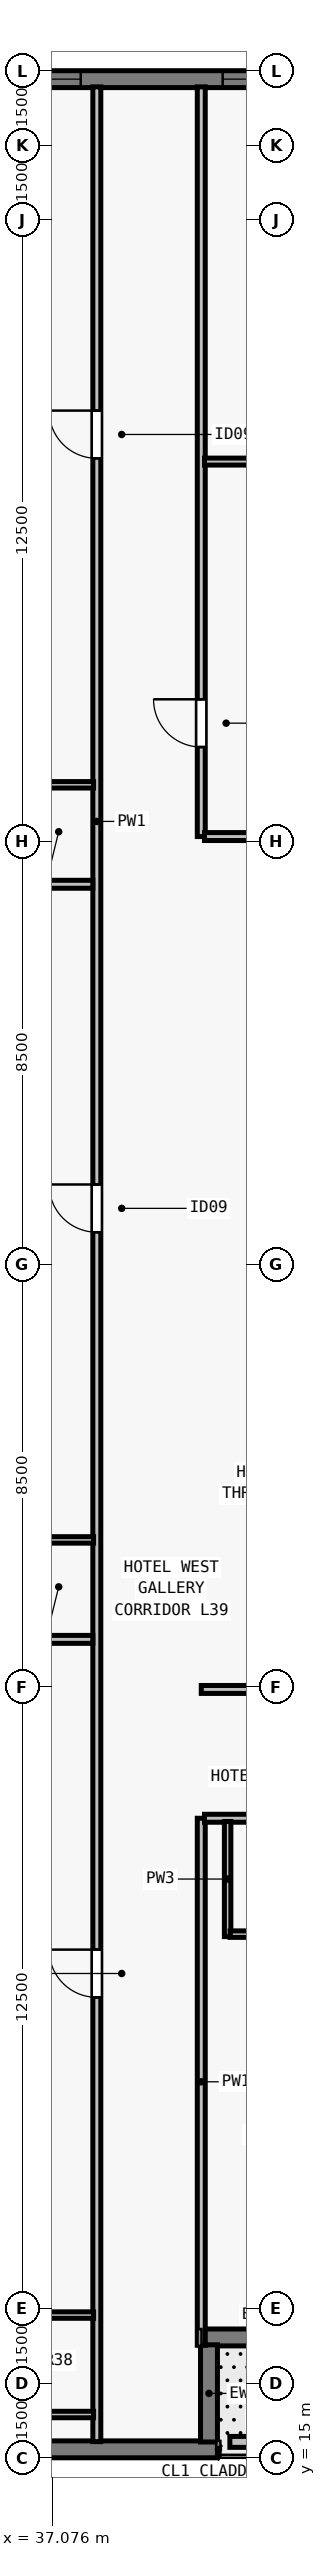
"""IFC4 building model, lengths in metres.
Left out: names, types, materials, properties, quantities, classifications, styles, units other than length and angle.
Written with IfcOpenShell. Run it as: python <this file> out.ifc"""

import sys

from ifc_helpers import new_model, si_unit, direction, frame, frame_2d, origin, place, context, subcontext, project, spatial, rectangle, extrude, element, fill, save


model = new_model("IFC4")
c1 = context("Model", 3, precision=1e-05, world=origin(), true_north=direction((0.0, 1.0)))
c2 = subcontext(c1, "Body", "Model", "MODEL_VIEW")
j1 = project(units=[si_unit("LENGTHUNIT", "METRE"), si_unit("PLANEANGLEUNIT", "RADIAN")], contexts=[c1])
p1 = place(None, origin())
s1 = spatial("IfcSite", under=j1, at=p1, CompositionType="ELEMENT")
p2 = place(p1, origin())
s2 = spatial("IfcBuilding", under=s1, at=p2, CompositionType="ELEMENT")
p3 = place(p2, frame((0.0, 0.0, 144.5)))
s3 = spatial("IfcBuildingStorey", under=s2, at=p3, CompositionType="ELEMENT", Elevation=144.5)
p4 = place(p3, frame((40.4, 15.17, 0.0), z_axis=(0.0, 0.0, 1.0), x_axis=(-1.0, 0.0, 0.0)))
e1 = element("IfcWall", 1, at=p4, inside=s3, PredefinedType="SOLIDWALL", context=c2, shape_type="SweptSolid", body=[
    extrude(rectangle(XDim=8.082, YDim=0.34, at=frame_2d((4.041, 0.0))), origin(), (0.0, 0.0, 1.0), 3.28),
])
p5 = place(p3, frame((32.0, 62.83, 0.0), z_axis=(0.0, 0.0, 1.0), x_axis=(1.0, 0.0, 0.0)))
e2 = element("IfcWall", 2, at=p5, inside=s3, PredefinedType="SOLIDWALL", context=c2, shape_type="SweptSolid", body=[
    extrude(rectangle(XDim=39.682, YDim=0.34, at=frame_2d((19.841, 0.0))), origin(), (0.0, 0.0, 1.0), 3.28),
])
p6 = place(p5, frame((3.902, 0.0, 0.8)))
e3 = element("IfcOpeningElement", 3, at=p6, cuts=e2, PredefinedType="OPENING", context=c2, shape_type="SweptSolid", body=[
    extrude(rectangle(XDim=1.75, YDim=1.66, at=frame_2d((0.875, 0.83))), frame((0.0, 0.18, 0.0), z_axis=(0.0, -1.0, 0.0), x_axis=(1.0, 0.0, 0.0)), (0.0, 0.0, 1.0), 0.36),
])
p7 = place(p5, frame((8.505, 0.0, 0.8)))
e4 = element("IfcOpeningElement", 4, at=p7, cuts=e2, PredefinedType="OPENING", context=c2, shape_type="SweptSolid", body=[
    extrude(rectangle(XDim=1.35, YDim=1.66, at=frame_2d((0.675, 0.83))), frame((0.0, 0.18, 0.0), z_axis=(0.0, -1.0, 0.0), x_axis=(1.0, 0.0, 0.0)), (0.0, 0.0, 1.0), 0.36),
])
p8 = place(p5, frame((11.859, 0.0, 0.8)))
e5 = element("IfcOpeningElement", 5, at=p8, cuts=e2, PredefinedType="OPENING", context=c2, shape_type="SweptSolid", body=[
    extrude(rectangle(XDim=1.75, YDim=1.66, at=frame_2d((0.875, 0.83))), frame((0.0, 0.18, 0.0), z_axis=(0.0, -1.0, 0.0), x_axis=(1.0, 0.0, 0.0)), (0.0, 0.0, 1.0), 0.36),
])
p9 = place(p5, frame((16.062, 0.0, 0.8)))
e6 = element("IfcOpeningElement", 6, at=p9, cuts=e2, PredefinedType="OPENING", context=c2, shape_type="SweptSolid", body=[
    extrude(rectangle(XDim=1.35, YDim=1.66, at=frame_2d((0.675, 0.83))), frame((0.0, 0.18, 0.0), z_axis=(0.0, -1.0, 0.0), x_axis=(1.0, 0.0, 0.0)), (0.0, 0.0, 1.0), 0.36),
])
p10 = place(p5, frame((17.716, 0.0, 0.8)))
e7 = element("IfcOpeningElement", 7, at=p10, cuts=e2, PredefinedType="OPENING", context=c2, shape_type="SweptSolid", body=[
    extrude(rectangle(XDim=1.75, YDim=1.66, at=frame_2d((0.875, 0.83))), frame((0.0, 0.18, 0.0), z_axis=(0.0, -1.0, 0.0), x_axis=(1.0, 0.0, 0.0)), (0.0, 0.0, 1.0), 0.36),
])
p11 = place(p5, frame((22.719, 0.0, 0.8)))
e8 = element("IfcOpeningElement", 8, at=p11, cuts=e2, PredefinedType="OPENING", context=c2, shape_type="SweptSolid", body=[
    extrude(rectangle(XDim=1.35, YDim=1.66, at=frame_2d((0.675, 0.83))), frame((0.0, 0.18, 0.0), z_axis=(0.0, -1.0, 0.0), x_axis=(1.0, 0.0, 0.0)), (0.0, 0.0, 1.0), 0.36),
])
p12 = place(p5, frame((26.073, 0.0, 0.8)))
e9 = element("IfcOpeningElement", 9, at=p12, cuts=e2, PredefinedType="OPENING", context=c2, shape_type="SweptSolid", body=[
    extrude(rectangle(XDim=1.75, YDim=1.66, at=frame_2d((0.875, 0.83))), frame((0.0, 0.18, 0.0), z_axis=(0.0, -1.0, 0.0), x_axis=(1.0, 0.0, 0.0)), (0.0, 0.0, 1.0), 0.36),
])
p13 = place(p5, frame((30.677, 0.0, 0.8)))
e10 = element("IfcOpeningElement", 10, at=p13, cuts=e2, PredefinedType="OPENING", context=c2, shape_type="SweptSolid", body=[
    extrude(rectangle(XDim=1.35, YDim=1.66, at=frame_2d((0.675, 0.83))), frame((0.0, 0.18, 0.0), z_axis=(0.0, -1.0, 0.0), x_axis=(1.0, 0.0, 0.0)), (0.0, 0.0, 1.0), 0.36),
])
p14 = place(p5, frame((33.18, 0.0, 0.8)))
e11 = element("IfcOpeningElement", 11, at=p14, cuts=e2, PredefinedType="OPENING", context=c2, shape_type="SweptSolid", body=[
    extrude(rectangle(XDim=1.75, YDim=1.66, at=frame_2d((0.875, 0.83))), frame((0.0, 0.18, 0.0), z_axis=(0.0, -1.0, 0.0), x_axis=(1.0, 0.0, 0.0)), (0.0, 0.0, 1.0), 0.36),
])
p15 = place(p3, frame((45.822, 17.42, 0.0), z_axis=(0.0, 0.0, 1.0), x_axis=(-1.0, 0.0, 0.0)))
e12 = element("IfcWall", 12, at=p15, inside=s3, PredefinedType="SOLIDWALL", context=c2, shape_type="SweptSolid", body=[
    extrude(rectangle(XDim=5.762, YDim=0.34, at=frame_2d((2.881, 0.0))), origin(), (0.0, 0.0, 1.0), 3.28),
])
p16 = place(p15, frame((2.381, 0.0, 0.0)))
e13 = element("IfcOpeningElement", 13, at=p16, cuts=e12, PredefinedType="OPENING", context=c2, shape_type="SweptSolid", body=[
    extrude(rectangle(XDim=1.0, YDim=2.15, at=frame_2d((0.5, 1.075))), frame((0.0, 0.18, 0.0), z_axis=(0.0, -1.0, 0.0), x_axis=(1.0, 0.0, 0.0)), (0.0, 0.0, 1.0), 0.36),
])
p17 = place(p3, frame((40.23, 17.272, 0.0), z_axis=(0.0, 0.0, 1.0), x_axis=(0.0, -1.0, 0.0)))
e14 = element("IfcWall", 14, at=p17, inside=s3, PredefinedType="SOLIDWALL", context=c2, shape_type="SweptSolid", body=[
    extrude(rectangle(XDim=1.954, YDim=0.34, at=frame_2d((0.977, 0.0))), origin(), (0.0, 0.0, 1.0), 3.28),
])
p18 = place(p3, frame((40.65, 15.32, 0.0), z_axis=(0.0, 0.0, 1.0), x_axis=(1.0, 0.0, 0.0)))
e15 = element("IfcWall", 15, at=p18, inside=s3, PredefinedType="PARAPET", context=c2, shape_type="SweptSolid", body=[
    extrude(rectangle(XDim=1.3, YDim=0.22, at=frame_2d((0.65, 0.0))), origin(), (0.0, 0.0, 1.0), 0.55),
])
p19 = place(p3, frame((37.975, 15.325, 0.0), z_axis=(0.0, 0.0, 1.0), x_axis=(0.0, 1.0, 0.0)))
e16 = element("IfcWall", 16, at=p19, inside=s3, PredefinedType="PARTITIONING", context=c2, shape_type="SweptSolid", body=[
    extrude(rectangle(XDim=47.35, YDim=0.16, at=frame_2d((23.675, 0.0))), origin(), (0.0, 0.0, 1.0), 2.555),
])
p20 = place(p19, frame((8.934, 0.0, 0.0)))
e17 = element("IfcOpeningElement", 17, at=p20, cuts=e16, PredefinedType="OPENING", context=c2, shape_type="SweptSolid", body=[
    extrude(rectangle(XDim=0.96, YDim=2.15, at=frame_2d((0.48, 1.075))), frame((0.0, 0.09, 0.0), z_axis=(0.0, -1.0, 0.0), x_axis=(1.0, 0.0, 0.0)), (0.0, 0.0, 1.0), 0.18),
])
p21 = place(p19, frame((24.319, 0.0, 0.0)))
e18 = element("IfcOpeningElement", 18, at=p21, cuts=e16, PredefinedType="OPENING", context=c2, shape_type="SweptSolid", body=[
    extrude(rectangle(XDim=0.96, YDim=2.15, at=frame_2d((0.48, 1.075))), frame((0.0, 0.09, 0.0), z_axis=(0.0, -1.0, 0.0), x_axis=(1.0, 0.0, 0.0)), (0.0, 0.0, 1.0), 0.18),
])
p22 = place(p19, frame((39.88, 0.0, 0.0)))
e19 = element("IfcOpeningElement", 19, at=p22, cuts=e16, PredefinedType="OPENING", context=c2, shape_type="SweptSolid", body=[
    extrude(rectangle(XDim=0.96, YDim=2.15, at=frame_2d((0.48, 1.075))), frame((0.0, 0.09, 0.0), z_axis=(0.0, -1.0, 0.0), x_axis=(1.0, 0.0, 0.0)), (0.0, 0.0, 1.0), 0.18),
])
p23 = place(p3, frame((40.075, 17.262, 0.0), z_axis=(0.0, 0.0, 1.0), x_axis=(0.0, 1.0, 0.0)))
e20 = element("IfcWall", 20, at=p23, inside=s3, PredefinedType="PARTITIONING", context=c2, shape_type="SweptSolid", body=[
    extrude(rectangle(XDim=10.598, YDim=0.16, at=frame_2d((5.299, 0.0))), origin(), (0.0, 0.0, 1.0), 2.555),
])
p24 = place(p3, frame((40.075, 47.6, 0.0), z_axis=(0.0, 0.0, 1.0), x_axis=(0.0, 1.0, 0.0)))
e21 = element("IfcWall", 21, at=p24, inside=s3, PredefinedType="PARTITIONING", context=c2, shape_type="SweptSolid", body=[
    extrude(rectangle(XDim=15.075, YDim=0.16, at=frame_2d((7.538, 0.0))), origin(), (0.0, 0.0, 1.0), 2.555),
])
p25 = place(p24, frame((1.8, 0.0, 0.0)))
e22 = element("IfcOpeningElement", 22, at=p25, cuts=e21, PredefinedType="OPENING", context=c2, shape_type="SweptSolid", body=[
    extrude(rectangle(XDim=0.96, YDim=2.12, at=frame_2d((0.48, 1.06))), frame((0.0, 0.09, 0.0), z_axis=(0.0, -1.0, 0.0), x_axis=(1.0, 0.0, 0.0)), (0.0, 0.0, 1.0), 0.18),
])
p26 = place(p3, frame((40.075, 30.45, 0.0), z_axis=(0.0, 0.0, 1.0), x_axis=(1.0, 0.0, 0.0)))
e23 = element("IfcWall", 23, at=p26, inside=s3, PredefinedType="PARTITIONING", context=c2, shape_type="SweptSolid", body=[
    extrude(rectangle(XDim=3.16, YDim=0.16, at=frame_2d((1.58, 0.0))), origin(), (0.0, 0.0, 1.0), 3.28),
])
p27 = place(p3, frame((40.14, 47.6, 0.0), z_axis=(0.0, 0.0, 1.0), x_axis=(1.0, 0.0, 0.0)))
e24 = element("IfcWall", 24, at=p27, inside=s3, PredefinedType="PARTITIONING", context=c2, shape_type="SweptSolid", body=[
    extrude(rectangle(XDim=3.095, YDim=0.16, at=frame_2d((1.548, 0.0))), origin(), (0.0, 0.0, 1.0), 3.28),
])
p28 = place(p3, frame((40.14, 27.86, 0.0), z_axis=(0.0, 0.0, 1.0), x_axis=(1.0, 0.0, 0.0)))
e25 = element("IfcWall", 25, at=p28, inside=s3, PredefinedType="PARTITIONING", context=c2, shape_type="SweptSolid", body=[
    extrude(rectangle(XDim=22.07, YDim=0.16, at=frame_2d((11.035, 0.0))), origin(), (0.0, 0.0, 1.0), 3.28),
])
p29 = place(p28, frame((3.834, 0.0, 0.0)))
e26 = element("IfcOpeningElement", 26, at=p29, cuts=e25, PredefinedType="OPENING", context=c2, shape_type="SweptSolid", body=[
    extrude(rectangle(XDim=0.96, YDim=2.15, at=frame_2d((0.48, 1.075))), frame((0.0, 0.09, 0.0), z_axis=(0.0, -1.0, 0.0), x_axis=(1.0, 0.0, 0.0)), (0.0, 0.0, 1.0), 0.18),
])
p30 = place(p28, frame((8.746, 0.0, 0.0)))
e27 = element("IfcOpeningElement", 27, at=p30, cuts=e25, PredefinedType="OPENING", context=c2, shape_type="SweptSolid", body=[
    extrude(rectangle(XDim=0.96, YDim=2.15, at=frame_2d((0.48, 1.075))), frame((0.0, 0.09, 0.0), z_axis=(0.0, -1.0, 0.0), x_axis=(1.0, 0.0, 0.0)), (0.0, 0.0, 1.0), 0.18),
])
p31 = place(p28, frame((14.46, 0.0, 0.0)))
e28 = element("IfcOpeningElement", 28, at=p31, cuts=e25, PredefinedType="OPENING", context=c2, shape_type="SweptSolid", body=[
    extrude(rectangle(XDim=0.96, YDim=2.15, at=frame_2d((0.48, 1.075))), frame((0.0, 0.09, 0.0), z_axis=(0.0, -1.0, 0.0), x_axis=(1.0, 0.0, 0.0)), (0.0, 0.0, 1.0), 0.18),
])
p32 = place(p28, frame((19.993, 0.0, 0.0)))
e29 = element("IfcOpeningElement", 29, at=p32, cuts=e25, PredefinedType="OPENING", context=c2, shape_type="SweptSolid", body=[
    extrude(rectangle(XDim=0.96, YDim=2.15, at=frame_2d((0.48, 1.075))), frame((0.0, 0.09, 0.0), z_axis=(0.0, -1.0, 0.0), x_axis=(1.0, 0.0, 0.0)), (0.0, 0.0, 1.0), 0.18),
])
p33 = place(p3, frame((40.14, 55.14, 0.0), z_axis=(0.0, 0.0, 1.0), x_axis=(1.0, 0.0, 0.0)))
e30 = element("IfcWall", 30, at=p33, inside=s3, PredefinedType="PARTITIONING", context=c2, shape_type="SweptSolid", body=[
    extrude(rectangle(XDim=22.07, YDim=0.14, at=frame_2d((11.035, 0.0))), origin(), (0.0, 0.0, 1.0), 3.28),
])
p34 = place(p33, frame((3.435, 0.0, 0.0)))
e31 = element("IfcOpeningElement", 31, at=p34, cuts=e30, PredefinedType="OPENING", context=c2, shape_type="SweptSolid", body=[
    extrude(rectangle(XDim=0.92, YDim=2.12, at=frame_2d((0.46, 1.06))), frame((0.0, 0.08, 0.0), z_axis=(0.0, -1.0, 0.0), x_axis=(1.0, 0.0, 0.0)), (0.0, 0.0, 1.0), 0.16),
])
p35 = place(p33, frame((14.435, 0.0, 0.0)))
e32 = element("IfcOpeningElement", 32, at=p35, cuts=e30, PredefinedType="OPENING", context=c2, shape_type="SweptSolid", body=[
    extrude(rectangle(XDim=0.92, YDim=2.12, at=frame_2d((0.46, 1.06))), frame((0.0, 0.08, 0.0), z_axis=(0.0, -1.0, 0.0), x_axis=(1.0, 0.0, 0.0)), (0.0, 0.0, 1.0), 0.16),
])
p36 = place(p3, frame((40.605, 25.48, 0.0), z_axis=(0.0, 0.0, 1.0), x_axis=(0.0, 1.0, 0.0)))
e33 = element("IfcWall", 33, at=p36, inside=s3, PredefinedType="PLUMBINGWALL", context=c2, shape_type="SweptSolid", body=[
    extrude(rectangle(XDim=2.315, YDim=0.13, at=frame_2d((1.157, 0.0))), origin(), (0.0, 0.0, 1.0), 2.555),
])
p37 = place(p3, frame((40.655, 25.53, 0.0), z_axis=(0.0, 0.0, 1.0), x_axis=(1.0, 0.0, 0.0)))
e34 = element("IfcWall", 34, at=p37, inside=s3, PredefinedType="PLUMBINGWALL", context=c2, shape_type="SweptSolid", body=[
    extrude(rectangle(XDim=1.9, YDim=0.13, at=frame_2d((0.95, 0.0))), origin(), (0.0, 0.0, 1.0), 3.28),
])
p38 = place(p37, frame((0.54, 0.0, 0.0)))
e35 = element("IfcOpeningElement", 35, at=p38, cuts=e34, PredefinedType="OPENING", context=c2, shape_type="SweptSolid", body=[
    extrude(rectangle(XDim=0.82, YDim=2.1, at=frame_2d((0.41, 1.05))), frame((0.0, 0.075, 0.0), z_axis=(0.0, -1.0, 0.0), x_axis=(1.0, 0.0, 0.0)), (0.0, 0.0, 1.0), 0.15),
])
for number, where, z_axis, x_axis in (
    (36, (35.595, 15.87, 0.0), (0.0, 0.0, 1.0), (1.0, 0.0, 0.0)),
    (37, (35.595, 17.87, 0.0), (0.0, 0.0, 1.0), (1.0, 0.0, 0.0)),
):
    element("IfcWall", number, at=place(p3, frame(where, z_axis=z_axis, x_axis=x_axis)), inside=s3, PredefinedType="PLUMBINGWALL", context=c2, shape_type="SweptSolid", body=[
        extrude(rectangle(XDim=2.315, YDim=0.13, at=frame_2d((1.157, 0.0))), origin(), (0.0, 0.0, 1.0), 3.28),
    ])
p39 = place(p3, frame((28.325, 31.457, 0.0), z_axis=(0.0, 0.0, 1.0), x_axis=(1.0, 0.0, 0.0)))
e38 = element("IfcWall", 38, at=p39, inside=s3, PredefinedType="PARTITIONING", context=c2, shape_type="SweptSolid", body=[
    extrude(rectangle(XDim=9.57, YDim=0.16, at=frame_2d((4.785, 0.0))), origin(), (0.0, 0.0, 1.0), 3.28),
])
p40 = place(p3, frame((35.595, 33.457, 0.0), z_axis=(0.0, 0.0, 1.0), x_axis=(1.0, 0.0, 0.0)))
e39 = element("IfcWall", 39, at=p40, inside=s3, PredefinedType="PLUMBINGWALL", context=c2, shape_type="SweptSolid", body=[
    extrude(rectangle(XDim=2.315, YDim=0.13, at=frame_2d((1.157, 0.0))), origin(), (0.0, 0.0, 1.0), 3.28),
])
p41 = place(p3, frame((28.325, 46.641, 0.0), z_axis=(0.0, 0.0, 1.0), x_axis=(1.0, 0.0, 0.0)))
e40 = element("IfcWall", 40, at=p41, inside=s3, PredefinedType="PARTITIONING", context=c2, shape_type="SweptSolid", body=[
    extrude(rectangle(XDim=9.57, YDim=0.16, at=frame_2d((4.785, 0.0))), origin(), (0.0, 0.0, 1.0), 3.28),
])
p42 = place(p3, frame((35.595, 48.641, 0.0), z_axis=(0.0, 0.0, 1.0), x_axis=(1.0, 0.0, 0.0)))
e41 = element("IfcWall", 41, at=p42, inside=s3, PredefinedType="PLUMBINGWALL", context=c2, shape_type="SweptSolid", body=[
    extrude(rectangle(XDim=2.315, YDim=0.13, at=frame_2d((1.157, 0.0))), origin(), (0.0, 0.0, 1.0), 3.28),
])
p43 = place(p6, origin())
e42 = element("IfcWindow", 42, at=p43, inside=s3, PartitioningType="SINGLE_PANEL", PredefinedType="WINDOW", context=c2, shape_type="SweptSolid", body=[
    extrude(rectangle(XDim=1.75, YDim=1.66, at=frame_2d((0.875, 0.83))), frame((0.0, -0.05, 0.0), z_axis=(0.0, -1.0, 0.0), x_axis=(1.0, 0.0, 0.0)), (0.0, 0.0, 1.0), 0.06),
])
fill(e3, e42)
p44 = place(p7, origin())
e43 = element("IfcWindow", 43, at=p44, inside=s3, PartitioningType="SINGLE_PANEL", PredefinedType="WINDOW", context=c2, shape_type="SweptSolid", body=[
    extrude(rectangle(XDim=1.35, YDim=1.66, at=frame_2d((0.675, 0.83))), frame((0.0, -0.05, 0.0), z_axis=(0.0, -1.0, 0.0), x_axis=(1.0, 0.0, 0.0)), (0.0, 0.0, 1.0), 0.06),
])
fill(e4, e43)
p45 = place(p25, origin())
e44 = element("IfcDoor", 44, at=p45, inside=s3, OperationType="SINGLE_SWING_RIGHT", PredefinedType="DOOR", context=c2, shape_type="SweptSolid", body=[
    extrude(rectangle(XDim=0.96, YDim=2.12, at=frame_2d((0.48, 1.06))), frame((0.0, 0.025, 0.0), z_axis=(0.0, -1.0, 0.0), x_axis=(1.0, 0.0, 0.0)), (0.0, 0.0, 1.0), 0.05),
])
fill(e22, e44)
p46 = place(p20, origin())
e45 = element("IfcDoor", 45, at=p46, inside=s3, OperationType="SINGLE_SWING_RIGHT", PredefinedType="DOOR", context=c2, shape_type="SweptSolid", body=[
    extrude(rectangle(XDim=0.96, YDim=2.15, at=frame_2d((0.48, 1.075))), frame((0.0, 0.025, 0.0), z_axis=(0.0, -1.0, 0.0), x_axis=(1.0, 0.0, 0.0)), (0.0, 0.0, 1.0), 0.05),
])
fill(e17, e45)
p47 = place(p21, origin())
e46 = element("IfcDoor", 46, at=p47, inside=s3, OperationType="SINGLE_SWING_RIGHT", PredefinedType="DOOR", context=c2, shape_type="SweptSolid", body=[
    extrude(rectangle(XDim=0.96, YDim=2.15, at=frame_2d((0.48, 1.075))), frame((0.0, 0.025, 0.0), z_axis=(0.0, -1.0, 0.0), x_axis=(1.0, 0.0, 0.0)), (0.0, 0.0, 1.0), 0.05),
])
fill(e18, e46)
p48 = place(p22, origin())
e47 = element("IfcDoor", 47, at=p48, inside=s3, OperationType="SINGLE_SWING_RIGHT", PredefinedType="DOOR", context=c2, shape_type="SweptSolid", body=[
    extrude(rectangle(XDim=0.96, YDim=2.15, at=frame_2d((0.48, 1.075))), frame((0.0, 0.025, 0.0), z_axis=(0.0, -1.0, 0.0), x_axis=(1.0, 0.0, 0.0)), (0.0, 0.0, 1.0), 0.05),
])
fill(e19, e47)
save(model, sys.argv[1])
